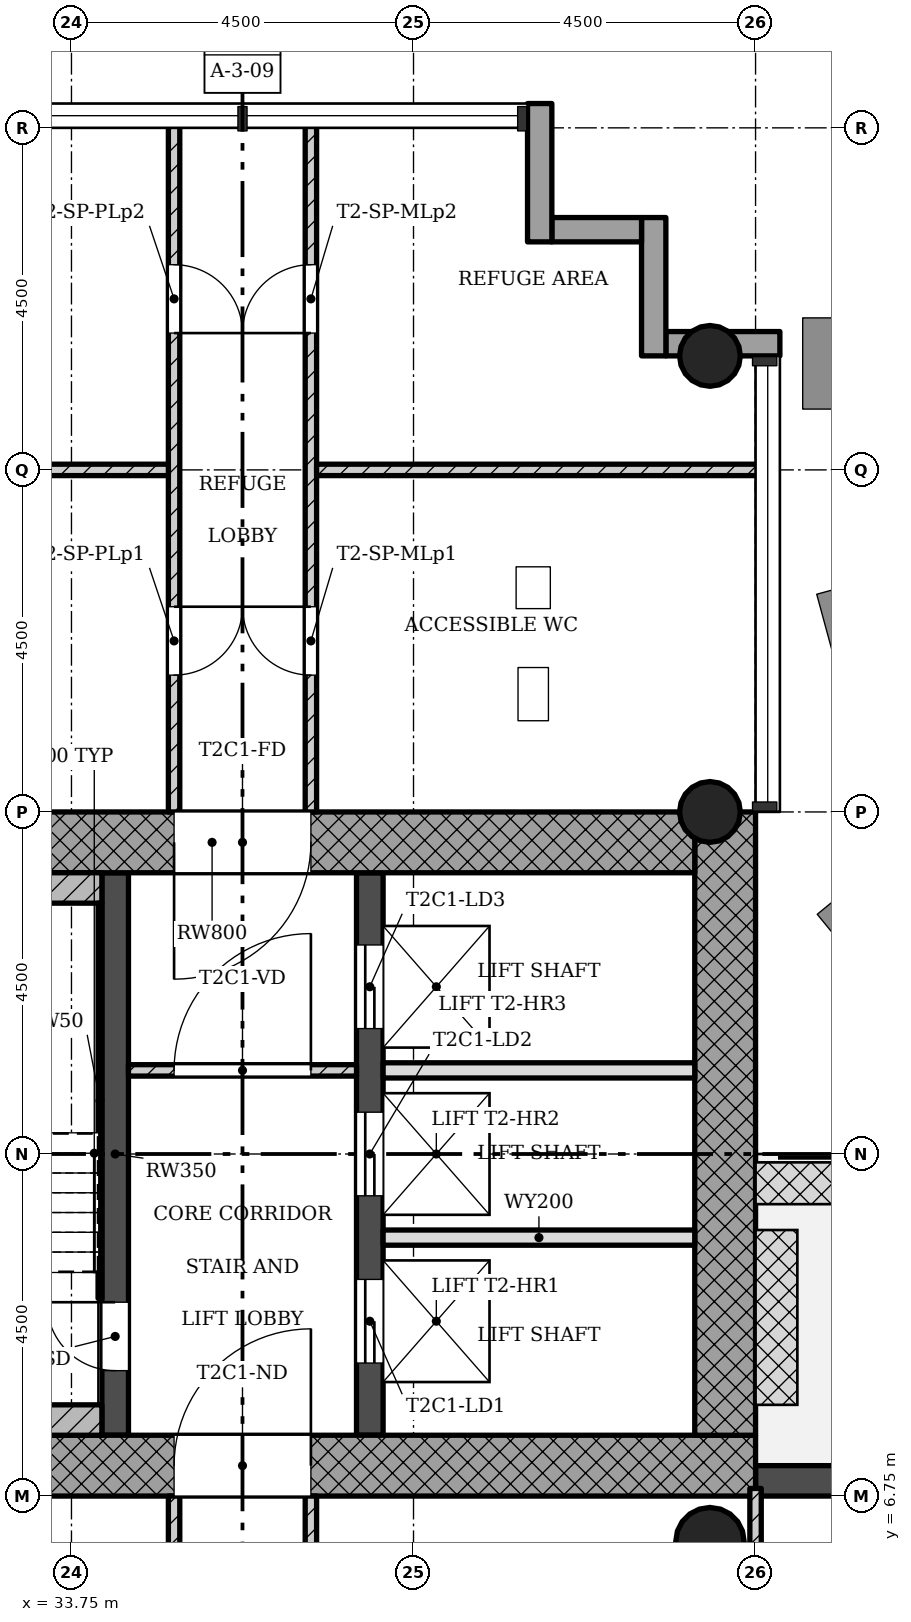
"""IFC4 building model, lengths in metres.
Left out: names, types, materials, properties, quantities, classifications, styles, units other than length and angle.
Written with IfcOpenShell. Run it as: python <this file> out.ifc"""

import sys

from ifc_helpers import new_model, si_unit, direction, frame, frame_2d, origin, origin_2d, place, context, subcontext, project, spatial, rectangle, hollow_circle, extrude, element, fill, save


model = new_model("IFC4")
c1 = context("Model", 3, precision=1e-05, world=origin(), true_north=direction((0.0, 1.0)))
c2 = subcontext(c1, "Body", "Model", "MODEL_VIEW")
j1 = project(units=[si_unit("LENGTHUNIT", "METRE"), si_unit("PLANEANGLEUNIT", "RADIAN")], contexts=[c1])
p1 = place(None, origin())
s1 = spatial("IfcSite", under=j1, at=p1, CompositionType="ELEMENT")
p2 = place(p1, origin())
s2 = spatial("IfcBuilding", under=s1, at=p2, CompositionType="ELEMENT")
p3 = place(p2, frame((0.0, 0.0, 128.7)))
s3 = spatial("IfcBuildingStorey", under=s2, at=p3, CompositionType="ELEMENT", Elevation=128.7)
p4 = place(p3, frame((30.05, 7.15, 0.0), z_axis=(0.0, 0.0, 1.0), x_axis=(1.0, 0.0, 0.0)))
e1 = element("IfcWall", 1, at=p4, inside=s3, PredefinedType="SHEAR", context=c2, shape_type="SweptSolid", body=[
    extrude(rectangle(XDim=12.7, YDim=0.8, at=frame_2d((6.35, 0.0))), origin(), (0.0, 0.0, 1.0), 5.0),
])
p5 = place(p4, frame((5.05, 0.0, 0.0)))
e2 = element("IfcOpeningElement", 2, at=p5, cuts=e1, PredefinedType="OPENING", context=c2, shape_type="SweptSolid", body=[
    extrude(rectangle(XDim=1.8, YDim=2.1, at=frame_2d((0.9, 1.05))), frame((0.0, 0.41, 0.0), z_axis=(0.0, -1.0, 0.0), x_axis=(1.0, 0.0, 0.0)), (0.0, 0.0, 1.0), 0.82),
])
p6 = place(p3, frame((42.35, 7.55, 0.0), z_axis=(0.0, 0.0, 1.0), x_axis=(0.0, 1.0, 0.0)))
e3 = element("IfcWall", 3, at=p6, inside=s3, PredefinedType="SHEAR", context=c2, shape_type="SweptSolid", body=[
    extrude(rectangle(XDim=8.2, YDim=0.8, at=frame_2d((4.1, 0.0))), origin(), (0.0, 0.0, 1.0), 5.0),
])
p7 = place(p3, frame((41.95, 15.35, 0.0), z_axis=(0.0, 0.0, 1.0), x_axis=(-1.0, 0.0, 0.0)))
e4 = element("IfcWall", 4, at=p7, inside=s3, PredefinedType="SHEAR", context=c2, shape_type="SweptSolid", body=[
    extrude(rectangle(XDim=12.7, YDim=0.8, at=frame_2d((6.35, 0.0))), origin(), (0.0, 0.0, 1.0), 5.0),
])
p8 = place(p7, frame((5.05, 0.0, 0.0)))
e5 = element("IfcOpeningElement", 5, at=p8, cuts=e4, PredefinedType="OPENING", context=c2, shape_type="SweptSolid", body=[
    extrude(rectangle(XDim=1.8, YDim=2.1, at=frame_2d((0.9, 1.05))), frame((0.0, 0.41, 0.0), z_axis=(0.0, -1.0, 0.0), x_axis=(1.0, 0.0, 0.0)), (0.0, 0.0, 1.0), 0.82),
])
p9 = place(p3, frame((34.325, 7.55, 0.0), z_axis=(0.0, 0.0, 1.0), x_axis=(0.0, 1.0, 0.0)))
e6 = element("IfcWall", 6, at=p9, inside=s3, PredefinedType="SHEAR", context=c2, shape_type="SweptSolid", body=[
    extrude(rectangle(XDim=7.4, YDim=0.35, at=frame_2d((3.7, 0.0))), origin(), (0.0, 0.0, 1.0), 5.0),
])
p10 = place(p9, frame((0.85, 0.0, 0.0)))
e7 = element("IfcOpeningElement", 7, at=p10, cuts=e6, PredefinedType="OPENING", context=c2, shape_type="SweptSolid", body=[
    extrude(rectangle(XDim=0.9, YDim=2.1, at=frame_2d((0.45, 1.05))), frame((0.0, 0.185, 0.0), z_axis=(0.0, -1.0, 0.0), x_axis=(1.0, 0.0, 0.0)), (0.0, 0.0, 1.0), 0.37),
])
p11 = place(p3, frame((37.675, 7.55, 0.0), z_axis=(0.0, 0.0, 1.0), x_axis=(0.0, 1.0, 0.0)))
e8 = element("IfcWall", 8, at=p11, inside=s3, PredefinedType="SHEAR", context=c2, shape_type="SweptSolid", body=[
    extrude(rectangle(XDim=7.4, YDim=0.35, at=frame_2d((3.7, 0.0))), origin(), (0.0, 0.0, 1.0), 5.0),
])
p12 = place(p11, frame((0.95, 0.0, 0.0)))
e9 = element("IfcOpeningElement", 9, at=p12, cuts=e8, PredefinedType="OPENING", context=c2, shape_type="SweptSolid", body=[
    extrude(rectangle(XDim=1.1, YDim=2.1, at=frame_2d((0.55, 1.05))), frame((0.0, 0.185, 0.0), z_axis=(0.0, -1.0, 0.0), x_axis=(1.0, 0.0, 0.0)), (0.0, 0.0, 1.0), 0.37),
])
p13 = place(p11, frame((3.15, 0.0, 0.0)))
e10 = element("IfcOpeningElement", 10, at=p13, cuts=e8, PredefinedType="OPENING", context=c2, shape_type="SweptSolid", body=[
    extrude(rectangle(XDim=1.1, YDim=2.1, at=frame_2d((0.55, 1.05))), frame((0.0, 0.185, 0.0), z_axis=(0.0, -1.0, 0.0), x_axis=(1.0, 0.0, 0.0)), (0.0, 0.0, 1.0), 0.37),
])
p14 = place(p11, frame((5.35, 0.0, 0.0)))
e11 = element("IfcOpeningElement", 11, at=p14, cuts=e8, PredefinedType="OPENING", context=c2, shape_type="SweptSolid", body=[
    extrude(rectangle(XDim=1.1, YDim=2.1, at=frame_2d((0.55, 1.05))), frame((0.0, 0.185, 0.0), z_axis=(0.0, -1.0, 0.0), x_axis=(1.0, 0.0, 0.0)), (0.0, 0.0, 1.0), 0.37),
])
for number, where, z_axis, x_axis in (
    (12, (42.15, 15.75, 0.0), (0.0, 0.0, 1.0), (1.0, 0.0, 0.0)),
    (13, (42.15, 21.75, 0.0), (0.0, 0.0, 1.0), (1.0, 0.0, 0.0)),
):
    element("IfcColumn", number, at=place(p3, frame(where, z_axis=z_axis, x_axis=x_axis)), inside=s3, PredefinedType="COLUMN", context=c2, shape_type="SweptSolid", body=[
        extrude(hollow_circle(Radius=0.4, WallThickness=0.028, at=origin_2d()), origin(), (0.0, 0.0, 1.0), 5.0),
    ])
p15 = place(p3, frame((42.15, 6.15, 0.0), z_axis=(0.0, 0.0, 1.0), x_axis=(1.0, 0.0, 0.0)))
e14 = element("IfcColumn", 14, at=p15, inside=s3, PredefinedType="COLUMN", context=c2, shape_type="SweptSolid", body=[
    extrude(hollow_circle(Radius=0.45, WallThickness=0.032, at=origin_2d()), origin(), (0.0, 0.0, 1.0), 5.0),
])
p16 = place(p3, frame((47.25, 6.95, -0.02), z_axis=(0.0, 0.0, 1.0), x_axis=(-1.0, 0.0, 0.0)))
e15 = element("IfcWall", 15, at=p16, inside=s3, PredefinedType="STANDARD", context=c2, shape_type="SweptSolid", body=[
    extrude(rectangle(XDim=4.5, YDim=0.4, at=frame_2d((2.25, 0.0))), origin(), (0.0, 0.0, 1.0), 4.72),
])
p17 = place(p16, frame((1.35, 0.0, 0.02)))
e16 = element("IfcOpeningElement", 16, at=p17, cuts=e15, PredefinedType="OPENING", context=c2, shape_type="SweptSolid", body=[
    extrude(rectangle(XDim=1.8, YDim=2.1, at=frame_2d((0.9, 1.05))), frame((0.0, 0.21, 0.0), z_axis=(0.0, -1.0, 0.0), x_axis=(1.0, 0.0, 0.0)), (0.0, 0.0, 1.0), 0.42),
])
p18 = place(p3, frame((43.07, 21.91, -0.3), z_axis=(0.0, 0.0, 1.0), x_axis=(-1.0, 0.0, 0.0)))
e17 = element("IfcWall", 17, at=p18, inside=s3, PredefinedType="STANDARD", context=c2, shape_type="SweptSolid", body=[
    extrude(rectangle(XDim=1.5, YDim=0.32, at=frame_2d((0.75, 0.0))), origin(), (0.0, 0.0, 1.0), 5.0),
])
p19 = place(p3, frame((41.41, 21.75, -0.3), z_axis=(0.0, 0.0, 1.0), x_axis=(0.0, 1.0, 0.0)))
e18 = element("IfcWall", 18, at=p19, inside=s3, PredefinedType="STANDARD", context=c2, shape_type="SweptSolid", body=[
    extrude(rectangle(XDim=1.82, YDim=0.32, at=frame_2d((0.91, 0.0))), origin(), (0.0, 0.0, 1.0), 5.0),
])
p20 = place(p3, frame((41.25, 23.41, -0.3), z_axis=(0.0, 0.0, 1.0), x_axis=(-1.0, 0.0, 0.0)))
e19 = element("IfcWall", 19, at=p20, inside=s3, PredefinedType="STANDARD", context=c2, shape_type="SweptSolid", body=[
    extrude(rectangle(XDim=1.18, YDim=0.32, at=frame_2d((0.59, 0.0))), origin(), (0.0, 0.0, 1.0), 5.0),
])
p21 = place(p3, frame((39.91, 23.25, -0.3), z_axis=(0.0, 0.0, 1.0), x_axis=(0.0, 1.0, 0.0)))
e20 = element("IfcWall", 20, at=p21, inside=s3, PredefinedType="STANDARD", context=c2, shape_type="SweptSolid", body=[
    extrude(rectangle(XDim=1.82, YDim=0.32, at=frame_2d((0.91, 0.0))), origin(), (0.0, 0.0, 1.0), 5.0),
])
p22 = place(p3, frame((37.5, 12.35, 0.0), z_axis=(0.0, 0.0, 1.0), x_axis=(-1.0, 0.0, 0.0)))
e21 = element("IfcWall", 21, at=p22, inside=s3, PredefinedType="PARTITIONING", context=c2, shape_type="SweptSolid", body=[
    extrude(rectangle(XDim=3.0, YDim=0.15, at=frame_2d((1.5, 0.0))), origin(), (0.0, 0.0, 1.0), 4.58),
])
p23 = place(p22, frame((0.6, 0.0, 0.0)))
e22 = element("IfcOpeningElement", 22, at=p23, cuts=e21, PredefinedType="OPENING", context=c2, shape_type="SweptSolid", body=[
    extrude(rectangle(XDim=1.8, YDim=2.1, at=frame_2d((0.9, 1.05))), frame((0.0, 0.085, 0.0), z_axis=(0.0, -1.0, 0.0), x_axis=(1.0, 0.0, 0.0)), (0.0, 0.0, 1.0), 0.17),
])
for number, where, z_axis, x_axis in (
    (23, (41.95, 10.15, 0.0), (0.0, 0.0, 1.0), (-1.0, 0.0, 0.0)),
    (24, (41.95, 12.35, 0.0), (0.0, 0.0, 1.0), (-1.0, 0.0, 0.0)),
):
    element("IfcWall", number, at=place(p3, frame(where, z_axis=z_axis, x_axis=x_axis)), inside=s3, PredefinedType="SOLIDWALL", context=c2, shape_type="SweptSolid", body=[
        extrude(rectangle(XDim=4.1, YDim=0.2, at=frame_2d((2.05, 0.0))), origin(), (0.0, 0.0, 1.0), 4.58),
    ])
p24 = place(p3, frame((35.1, 0.9, 0.0), z_axis=(0.0, 0.0, 1.0), x_axis=(0.0, 1.0, 0.0)))
e25 = element("IfcWall", 25, at=p24, inside=s3, PredefinedType="PARTITIONING", context=c2, shape_type="SweptSolid", body=[
    extrude(rectangle(XDim=5.85, YDim=0.15, at=frame_2d((2.925, 0.0))), origin(), (0.0, 0.0, 1.0), 4.58),
])
p25 = place(p24, frame((2.475, 0.0, 0.0)))
e26 = element("IfcOpeningElement", 26, at=p25, cuts=e25, PredefinedType="OPENING", context=c2, shape_type="SweptSolid", body=[
    extrude(rectangle(XDim=0.9, YDim=2.1, at=frame_2d((0.45, 1.05))), frame((0.0, 0.085, 0.0), z_axis=(0.0, -1.0, 0.0), x_axis=(1.0, 0.0, 0.0)), (0.0, 0.0, 1.0), 0.17),
])
p26 = place(p3, frame((36.9, 0.9, 0.0), z_axis=(0.0, 0.0, 1.0), x_axis=(0.0, 1.0, 0.0)))
e27 = element("IfcWall", 27, at=p26, inside=s3, PredefinedType="PARTITIONING", context=c2, shape_type="SweptSolid", body=[
    extrude(rectangle(XDim=5.85, YDim=0.15, at=frame_2d((2.925, 0.0))), origin(), (0.0, 0.0, 1.0), 4.58),
])
p27 = place(p26, frame((2.475, 0.0, 0.0)))
e28 = element("IfcOpeningElement", 28, at=p27, cuts=e27, PredefinedType="OPENING", context=c2, shape_type="SweptSolid", body=[
    extrude(rectangle(XDim=0.9, YDim=2.1, at=frame_2d((0.45, 1.05))), frame((0.0, 0.085, 0.0), z_axis=(0.0, -1.0, 0.0), x_axis=(1.0, 0.0, 0.0)), (0.0, 0.0, 1.0), 0.17),
])
p28 = place(p3, frame((35.1, 15.75, 0.0), z_axis=(0.0, 0.0, 1.0), x_axis=(0.0, 1.0, 0.0)))
e29 = element("IfcWall", 29, at=p28, inside=s3, PredefinedType="PARTITIONING", context=c2, shape_type="SweptSolid", body=[
    extrude(rectangle(XDim=9.1, YDim=0.15, at=frame_2d((4.55, 0.0))), origin(), (0.0, 0.0, 1.0), 4.58),
])
p29 = place(p28, frame((1.8, 0.0, 0.0)))
e30 = element("IfcOpeningElement", 30, at=p29, cuts=e29, PredefinedType="OPENING", context=c2, shape_type="SweptSolid", body=[
    extrude(rectangle(XDim=0.9, YDim=2.1, at=frame_2d((0.45, 1.05))), frame((0.0, 0.085, 0.0), z_axis=(0.0, -1.0, 0.0), x_axis=(1.0, 0.0, 0.0)), (0.0, 0.0, 1.0), 0.17),
])
p30 = place(p28, frame((6.3, 0.0, 0.0)))
e31 = element("IfcOpeningElement", 31, at=p30, cuts=e29, PredefinedType="OPENING", context=c2, shape_type="SweptSolid", body=[
    extrude(rectangle(XDim=0.9, YDim=2.1, at=frame_2d((0.45, 1.05))), frame((0.0, 0.085, 0.0), z_axis=(0.0, -1.0, 0.0), x_axis=(1.0, 0.0, 0.0)), (0.0, 0.0, 1.0), 0.17),
])
p31 = place(p3, frame((35.025, 20.25, 0.0), z_axis=(0.0, 0.0, 1.0), x_axis=(-1.0, 0.0, 0.0)))
e32 = element("IfcWall", 32, at=p31, inside=s3, PredefinedType="PARTITIONING", context=c2, shape_type="SweptSolid", body=[
    extrude(rectangle(XDim=5.875, YDim=0.15, at=frame_2d((2.938, 0.0))), origin(), (0.0, 0.0, 1.0), 4.58),
])
p32 = place(p3, frame((36.9, 15.75, 0.0), z_axis=(0.0, 0.0, 1.0), x_axis=(0.0, 1.0, 0.0)))
e33 = element("IfcWall", 33, at=p32, inside=s3, PredefinedType="PARTITIONING", context=c2, shape_type="SweptSolid", body=[
    extrude(rectangle(XDim=9.1, YDim=0.15, at=frame_2d((4.55, 0.0))), origin(), (0.0, 0.0, 1.0), 4.58),
])
p33 = place(p32, frame((1.8, 0.0, 0.0)))
e34 = element("IfcOpeningElement", 34, at=p33, cuts=e33, PredefinedType="OPENING", context=c2, shape_type="SweptSolid", body=[
    extrude(rectangle(XDim=0.9, YDim=2.1, at=frame_2d((0.45, 1.05))), frame((0.0, 0.085, 0.0), z_axis=(0.0, -1.0, 0.0), x_axis=(1.0, 0.0, 0.0)), (0.0, 0.0, 1.0), 0.17),
])
p34 = place(p32, frame((6.3, 0.0, 0.0)))
e35 = element("IfcOpeningElement", 35, at=p34, cuts=e33, PredefinedType="OPENING", context=c2, shape_type="SweptSolid", body=[
    extrude(rectangle(XDim=0.9, YDim=2.1, at=frame_2d((0.45, 1.05))), frame((0.0, 0.085, 0.0), z_axis=(0.0, -1.0, 0.0), x_axis=(1.0, 0.0, 0.0)), (0.0, 0.0, 1.0), 0.17),
])
p35 = place(p3, frame((36.975, 20.25, 0.0), z_axis=(0.0, 0.0, 1.0), x_axis=(1.0, 0.0, 0.0)))
e36 = element("IfcWall", 36, at=p35, inside=s3, PredefinedType="PARTITIONING", context=c2, shape_type="SweptSolid", body=[
    extrude(rectangle(XDim=5.875, YDim=0.15, at=frame_2d((2.938, 0.0))), origin(), (0.0, 0.0, 1.0), 4.58),
])
p36 = place(p3, frame((42.75, -6.85, 0.0), z_axis=(0.0, 0.0, 1.0), x_axis=(0.0, 1.0, 0.0)))
e37 = element("IfcWall", 37, at=p36, inside=s3, PredefinedType="PARTITIONING", context=c2, shape_type="SweptSolid", body=[
    extrude(rectangle(XDim=13.7, YDim=0.15, at=frame_2d((6.85, 0.0))), origin(), (0.0, 0.0, 1.0), 4.58),
])
p37 = place(p36, frame((5.95, 0.0, 0.0)))
e38 = element("IfcOpeningElement", 38, at=p37, cuts=e37, PredefinedType="OPENING", context=c2, shape_type="SweptSolid", body=[
    extrude(rectangle(XDim=1.8, YDim=2.1, at=frame_2d((0.9, 1.05))), frame((0.0, 0.085, 0.0), z_axis=(0.0, -1.0, 0.0), x_axis=(1.0, 0.0, 0.0)), (0.0, 0.0, 1.0), 0.17),
])
for number, where, z_axis, x_axis in (
    (39, (34.15, 14.75, 0.0), (0.0, 0.0, 1.0), (-1.0, 0.0, 0.0)),
    (40, (34.15, 7.75, 0.0), (0.0, 0.0, 1.0), (-1.0, 0.0, 0.0)),
):
    element("IfcWall", number, at=place(p3, frame(where, z_axis=z_axis, x_axis=x_axis)), inside=s3, PredefinedType="SHEAR", context=c2, shape_type="SweptSolid", body=[
        extrude(rectangle(XDim=4.1, YDim=0.4, at=frame_2d((2.05, 0.0))), origin(), (0.0, 0.0, 1.0), 5.0),
    ])
p38 = place(p3, frame((34.125, 9.35, 0.0), z_axis=(0.0, 0.0, 1.0), x_axis=(0.0, 1.0, 0.0)))
e41 = element("IfcWall", 41, at=p38, inside=s3, PredefinedType="SHEAR", context=c2, shape_type="SweptSolid", body=[
    extrude(rectangle(XDim=5.2, YDim=0.05, at=frame_2d((2.6, 0.0))), origin(), (0.0, 0.0, 1.0), 5.0),
])
p39 = place(p23, origin())
e42 = element("IfcDoor", 42, at=p39, inside=s3, OperationType="SINGLE_SWING_LEFT", PredefinedType="DOOR", context=c2, shape_type="SweptSolid", body=[
    extrude(rectangle(XDim=1.8, YDim=2.1, at=frame_2d((0.9, 1.05))), frame((0.0, 0.025, 0.0), z_axis=(0.0, -1.0, 0.0), x_axis=(1.0, 0.0, 0.0)), (0.0, 0.0, 1.0), 0.05),
])
fill(e22, e42)
p40 = place(p29, origin())
e43 = element("IfcDoor", 43, at=p40, inside=s3, OperationType="SINGLE_SWING_RIGHT", PredefinedType="DOOR", context=c2, shape_type="SweptSolid", body=[
    extrude(rectangle(XDim=0.9, YDim=2.1, at=frame_2d((0.45, 1.05))), frame((0.0, 0.025, 0.0), z_axis=(0.0, -1.0, 0.0), x_axis=(1.0, 0.0, 0.0)), (0.0, 0.0, 1.0), 0.05),
])
fill(e30, e43)
p41 = place(p30, origin())
e44 = element("IfcDoor", 44, at=p41, inside=s3, OperationType="SINGLE_SWING_LEFT", PredefinedType="DOOR", context=c2, shape_type="SweptSolid", body=[
    extrude(rectangle(XDim=0.9, YDim=2.1, at=frame_2d((0.45, 1.05))), frame((0.0, 0.025, 0.0), z_axis=(0.0, -1.0, 0.0), x_axis=(1.0, 0.0, 0.0)), (0.0, 0.0, 1.0), 0.05),
])
fill(e31, e44)
p42 = place(p33, origin())
e45 = element("IfcDoor", 45, at=p42, inside=s3, OperationType="SINGLE_SWING_LEFT", PredefinedType="DOOR", context=c2, shape_type="SweptSolid", body=[
    extrude(rectangle(XDim=0.9, YDim=2.1, at=frame_2d((0.45, 1.05))), frame((0.0, 0.025, 0.0), z_axis=(0.0, -1.0, 0.0), x_axis=(1.0, 0.0, 0.0)), (0.0, 0.0, 1.0), 0.05),
])
fill(e34, e45)
p43 = place(p34, origin())
e46 = element("IfcDoor", 46, at=p43, inside=s3, OperationType="SINGLE_SWING_RIGHT", PredefinedType="DOOR", context=c2, shape_type="SweptSolid", body=[
    extrude(rectangle(XDim=0.9, YDim=2.1, at=frame_2d((0.45, 1.05))), frame((0.0, 0.025, 0.0), z_axis=(0.0, -1.0, 0.0), x_axis=(1.0, 0.0, 0.0)), (0.0, 0.0, 1.0), 0.05),
])
fill(e35, e46)
p44 = place(p10, origin())
e47 = element("IfcDoor", 47, at=p44, inside=s3, OperationType="SINGLE_SWING_LEFT", PredefinedType="DOOR", context=c2, shape_type="SweptSolid", body=[
    extrude(rectangle(XDim=0.9, YDim=2.1, at=frame_2d((0.45, 1.05))), frame((0.0, 0.025, 0.0), z_axis=(0.0, -1.0, 0.0), x_axis=(1.0, 0.0, 0.0)), (0.0, 0.0, 1.0), 0.05),
])
fill(e7, e47)
p45 = place(p12, origin())
e48 = element("IfcDoor", 48, at=p45, inside=s3, OperationType="SLIDING_TO_LEFT", PredefinedType="DOOR", context=c2, shape_type="SweptSolid", body=[
    extrude(rectangle(XDim=1.1, YDim=2.1, at=frame_2d((0.55, 1.05))), frame((0.0, 0.025, 0.0), z_axis=(0.0, -1.0, 0.0), x_axis=(1.0, 0.0, 0.0)), (0.0, 0.0, 1.0), 0.05),
])
fill(e9, e48)
p46 = place(p13, origin())
e49 = element("IfcDoor", 49, at=p46, inside=s3, OperationType="SLIDING_TO_LEFT", PredefinedType="DOOR", context=c2, shape_type="SweptSolid", body=[
    extrude(rectangle(XDim=1.1, YDim=2.1, at=frame_2d((0.55, 1.05))), frame((0.0, 0.025, 0.0), z_axis=(0.0, -1.0, 0.0), x_axis=(1.0, 0.0, 0.0)), (0.0, 0.0, 1.0), 0.05),
])
fill(e10, e49)
p47 = place(p14, origin())
e50 = element("IfcDoor", 50, at=p47, inside=s3, OperationType="SLIDING_TO_LEFT", PredefinedType="DOOR", context=c2, shape_type="SweptSolid", body=[
    extrude(rectangle(XDim=1.1, YDim=2.1, at=frame_2d((0.55, 1.05))), frame((0.0, 0.025, 0.0), z_axis=(0.0, -1.0, 0.0), x_axis=(1.0, 0.0, 0.0)), (0.0, 0.0, 1.0), 0.05),
])
fill(e11, e50)
p48 = place(p5, origin())
e51 = element("IfcDoor", 51, at=p48, inside=s3, OperationType="SINGLE_SWING_LEFT", PredefinedType="DOOR", context=c2, shape_type="SweptSolid", body=[
    extrude(rectangle(XDim=1.8, YDim=2.1, at=frame_2d((0.9, 1.05))), frame((0.0, 0.025, 0.0), z_axis=(0.0, -1.0, 0.0), x_axis=(1.0, 0.0, 0.0)), (0.0, 0.0, 1.0), 0.05),
])
fill(e2, e51)
p49 = place(p8, origin())
e52 = element("IfcDoor", 52, at=p49, inside=s3, OperationType="SINGLE_SWING_LEFT", PredefinedType="DOOR", context=c2, shape_type="SweptSolid", body=[
    extrude(rectangle(XDim=1.8, YDim=2.1, at=frame_2d((0.9, 1.05))), frame((0.0, 0.025, 0.0), z_axis=(0.0, -1.0, 0.0), x_axis=(1.0, 0.0, 0.0)), (0.0, 0.0, 1.0), 0.05),
])
fill(e5, e52)
save(model, sys.argv[1])
